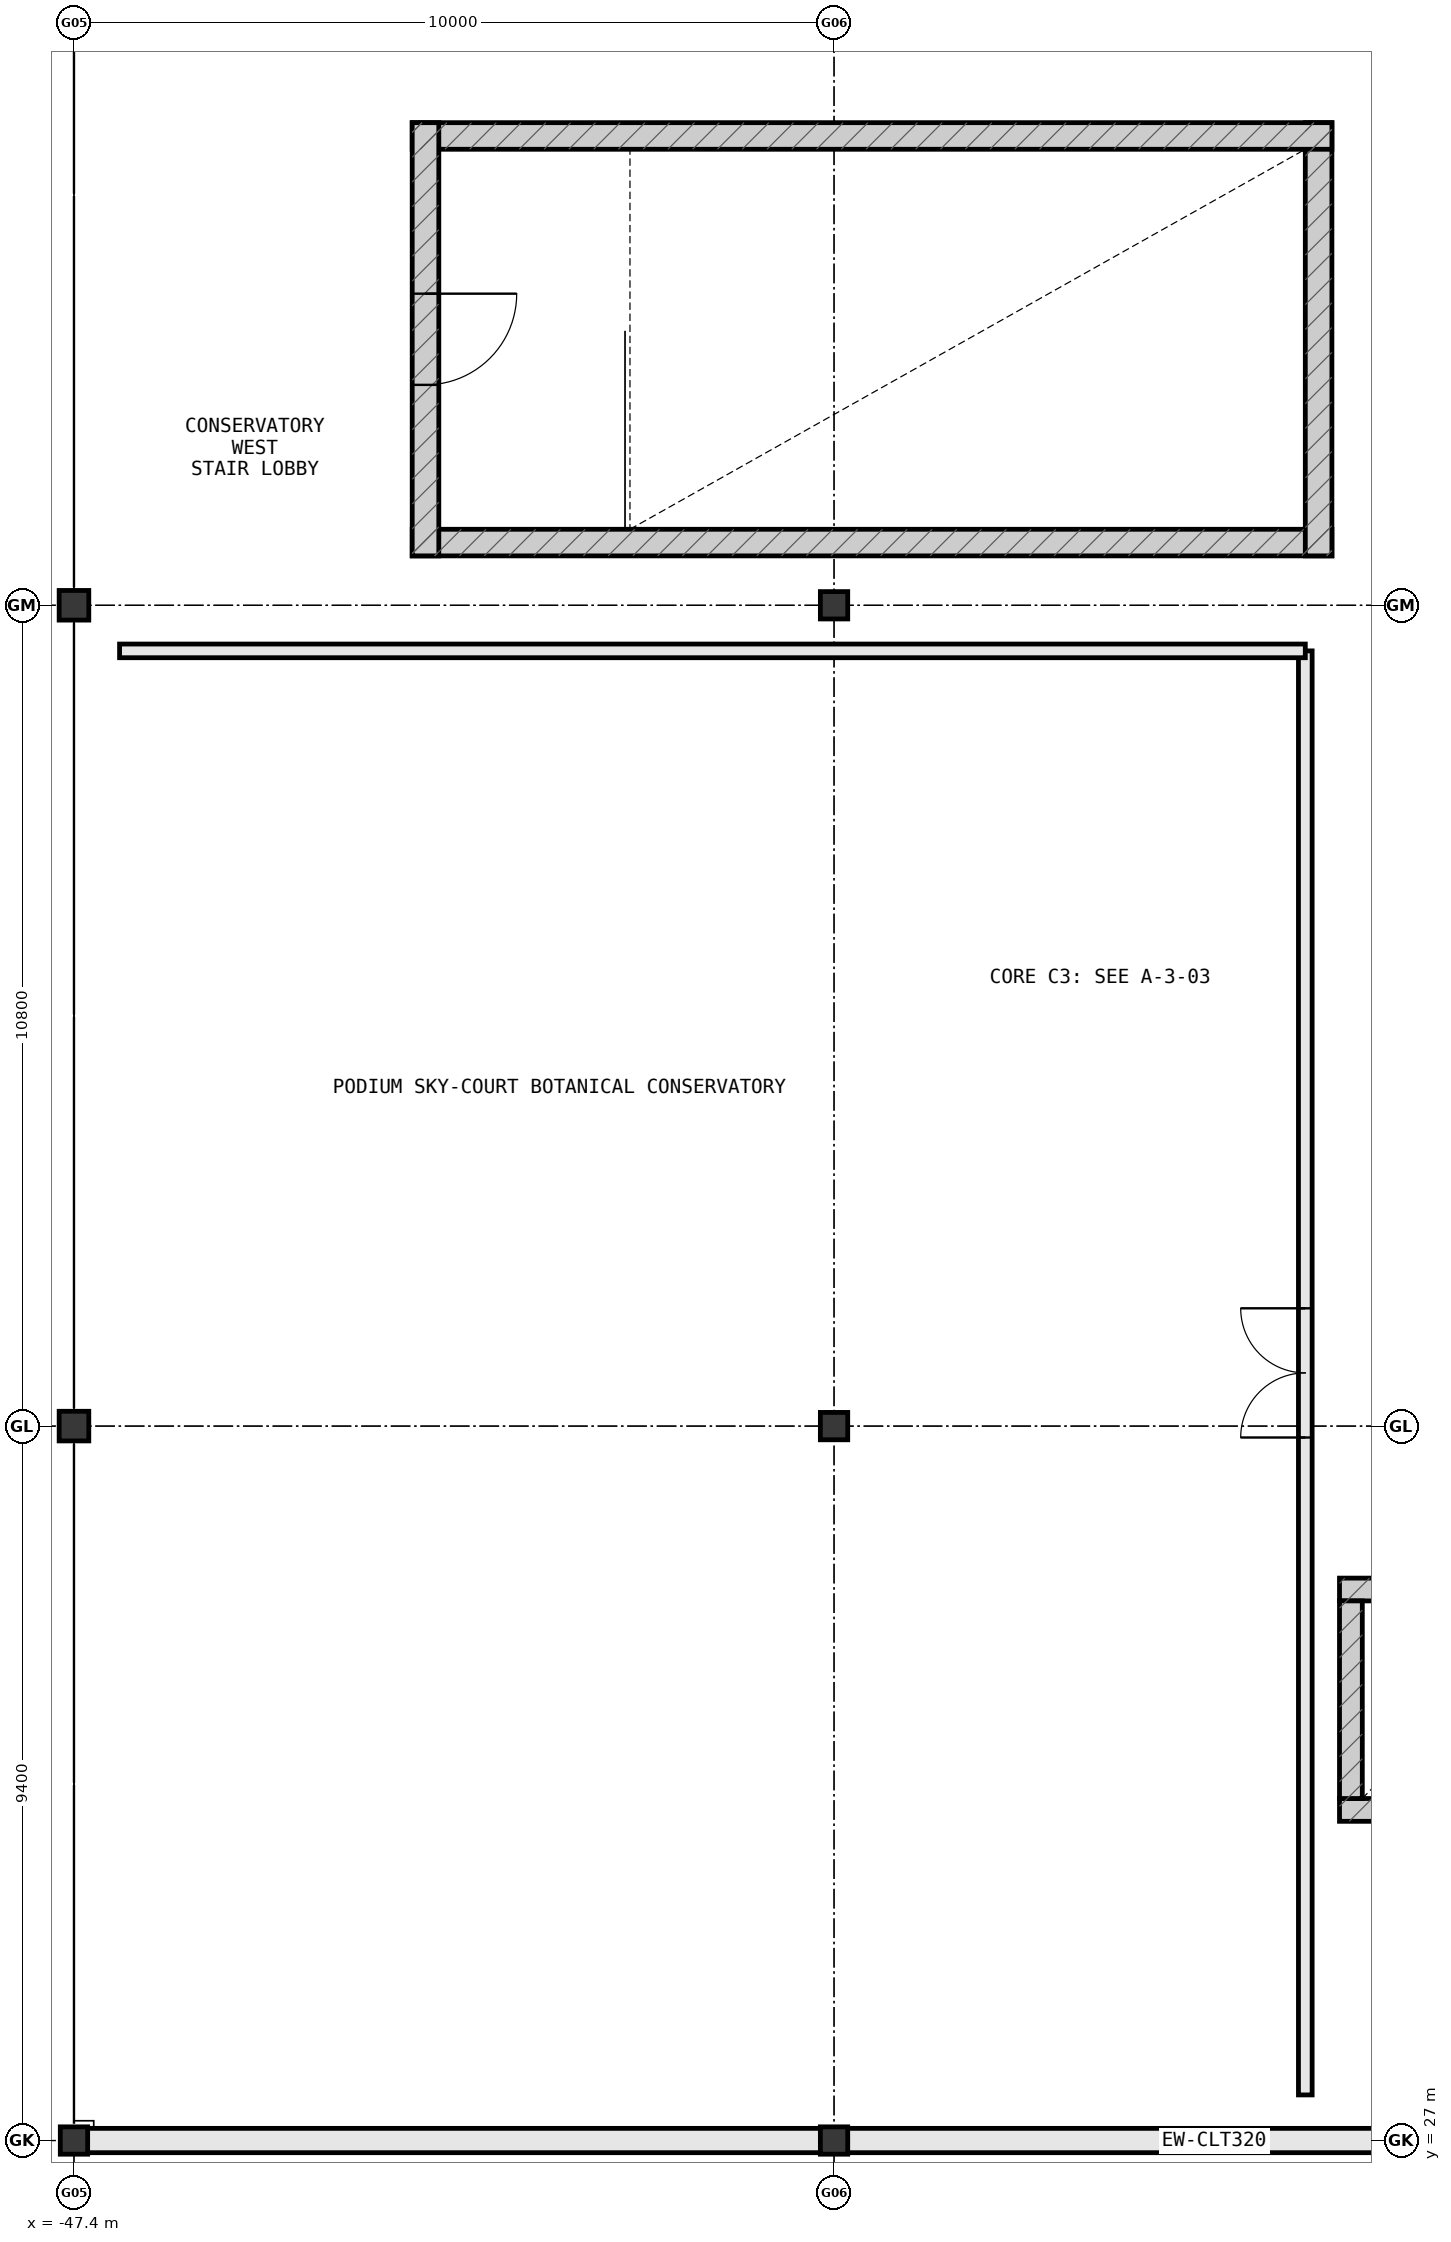
"""IFC4 building model, lengths in metres.
Left out: names, types, materials, properties, quantities, classifications, styles, units other than length and angle.
Written with IfcOpenShell. Run it as: python <this file> out.ifc"""

import sys

from ifc_helpers import new_model, si_unit, direction, frame, frame_2d, origin, origin_2d, place, context, subcontext, project, spatial, rectangle, extrude, element, fill, save


model = new_model("IFC4")
c1 = context("Model", 3, precision=1e-05, world=origin(), true_north=direction((0.0, 1.0)))
c2 = subcontext(c1, "Body", "Model", "MODEL_VIEW")
j1 = project(units=[si_unit("LENGTHUNIT", "METRE"), si_unit("PLANEANGLEUNIT", "RADIAN")], contexts=[c1])
p1 = place(None, origin())
s1 = spatial("IfcSite", under=j1, at=p1, CompositionType="ELEMENT")
p2 = place(p1, origin())
s2 = spatial("IfcBuilding", under=s1, at=p2, CompositionType="ELEMENT")
p3 = place(p2, frame((0.0, 0.0, 16.2)))
s3 = spatial("IfcBuildingStorey", under=s2, at=p3, CompositionType="ELEMENT", Elevation=16.2)
p4 = place(p3, frame((-47.4, 27.0, 0.0), z_axis=(0.0, 0.0, 1.0), x_axis=(1.0, 0.0, 0.0)))
e1 = element("IfcColumn", 1, at=p4, inside=s3, PredefinedType="COLUMN", context=c2, shape_type="SweptSolid", body=[
    extrude(rectangle(XDim=0.36, YDim=0.36, at=origin_2d()), origin(), (0.0, 0.0, 1.0), 7.149),
])
p5 = place(p3, frame((-37.4, 27.0, 0.0), z_axis=(0.0, 0.0, 1.0), x_axis=(1.0, 0.0, 0.0)))
e2 = element("IfcColumn", 2, at=p5, inside=s3, PredefinedType="COLUMN", context=c2, shape_type="SweptSolid", body=[
    extrude(rectangle(XDim=0.36, YDim=0.36, at=origin_2d()), origin(), (0.0, 0.0, 1.0), 6.968),
])
for number, where, z_axis, x_axis in (
    (3, (-47.4, 36.4, 0.0), (0.0, 0.0, 1.0), (1.0, 0.0, 0.0)),
    (4, (-47.4, 47.2, 0.0), (0.0, 0.0, 1.0), (1.0, 0.0, 0.0)),
):
    element("IfcColumn", number, at=place(p3, frame(where, z_axis=z_axis, x_axis=x_axis)), inside=s3, PredefinedType="COLUMN", context=c2, shape_type="SweptSolid", body=[
        extrude(rectangle(XDim=0.39, YDim=0.39, at=origin_2d()), origin(), (0.0, 0.0, 1.0), 3.8),
    ])
for number, where, z_axis, x_axis in (
    (5, (-37.4, 36.4, 0.0), (0.0, 0.0, 1.0), (1.0, 0.0, 0.0)),
    (6, (-37.4, 47.2, 0.0), (0.0, 0.0, 1.0), (1.0, 0.0, 0.0)),
):
    element("IfcColumn", number, at=place(p3, frame(where, z_axis=z_axis, x_axis=x_axis)), inside=s3, PredefinedType="COLUMN", context=c2, shape_type="SweptSolid", body=[
        extrude(rectangle(XDim=0.36, YDim=0.36, at=origin_2d()), origin(), (0.0, 0.0, 1.0), 3.8),
    ])
for number, where, z_axis, x_axis in (
    (7, (-47.222, 27.0, 0.0), (0.0, 0.0, 1.0), (1.0, 0.0, 0.0)),
    (8, (-37.222, 27.0, 0.0), (0.0, 0.0, 1.0), (1.0, 0.0, 0.0)),
):
    element("IfcWall", number, at=place(p3, frame(where, z_axis=z_axis, x_axis=x_axis)), inside=s3, PredefinedType="STANDARD", context=c2, shape_type="SweptSolid", body=[
        extrude(rectangle(XDim=9.644, YDim=0.32, at=frame_2d((4.822, 0.0))), origin(), (0.0, 0.0, 1.0), 2.795),
    ])
p6 = place(p3, frame((-42.95, 48.025, 0.0), z_axis=(0.0, 0.0, 1.0), x_axis=(1.0, 0.0, 0.0)))
e9 = element("IfcWall", 9, at=p6, inside=s3, PredefinedType="SHEAR", context=c2, shape_type="SweptSolid", body=[
    extrude(rectangle(XDim=12.1, YDim=0.35, at=frame_2d((6.05, 0.0))), origin(), (0.0, 0.0, 1.0), 3.56),
])
p7 = place(p3, frame((-31.025, 47.85, 0.0), z_axis=(0.0, 0.0, 1.0), x_axis=(0.0, 1.0, 0.0)))
e10 = element("IfcWall", 10, at=p7, inside=s3, PredefinedType="SHEAR", context=c2, shape_type="SweptSolid", body=[
    extrude(rectangle(XDim=5.7, YDim=0.35, at=frame_2d((2.85, 0.0))), origin(), (0.0, 0.0, 1.0), 3.56),
])
p8 = place(p3, frame((-30.85, 53.375, 0.0), z_axis=(0.0, 0.0, 1.0), x_axis=(-1.0, 0.0, 0.0)))
e11 = element("IfcWall", 11, at=p8, inside=s3, PredefinedType="SHEAR", context=c2, shape_type="SweptSolid", body=[
    extrude(rectangle(XDim=12.1, YDim=0.35, at=frame_2d((6.05, 0.0))), origin(), (0.0, 0.0, 1.0), 3.56),
])
p9 = place(p3, frame((-42.775, 53.55, 0.0), z_axis=(0.0, 0.0, 1.0), x_axis=(0.0, -1.0, 0.0)))
e12 = element("IfcWall", 12, at=p9, inside=s3, PredefinedType="SHEAR", context=c2, shape_type="SweptSolid", body=[
    extrude(rectangle(XDim=5.7, YDim=0.35, at=frame_2d((2.85, 0.0))), origin(), (0.0, 0.0, 1.0), 3.56),
])
p10 = place(p9, frame((2.25, 0.0, 0.0)))
e13 = element("IfcOpeningElement", 13, at=p10, cuts=e12, PredefinedType="OPENING", context=c2, shape_type="SweptSolid", body=[
    extrude(rectangle(XDim=1.2, YDim=2.2, at=frame_2d((0.6, 1.1))), frame((0.0, 0.187, 0.0), z_axis=(0.0, -1.0, 0.0), x_axis=(1.0, 0.0, 0.0)), (0.0, 0.0, 1.0), 0.374),
])
p11 = place(p3, frame((-30.75, 31.35, 0.0), z_axis=(0.0, 0.0, 1.0), x_axis=(1.0, 0.0, 0.0)))
e14 = element("IfcWall", 14, at=p11, inside=s3, PredefinedType="SHEAR", context=c2, shape_type="SweptSolid", body=[
    extrude(rectangle(XDim=3.1, YDim=0.3, at=frame_2d((1.55, 0.0))), origin(), (0.0, 0.0, 1.0), 3.56),
])
p12 = place(p11, frame((0.95, 0.0, 0.0)))
e15 = element("IfcOpeningElement", 15, at=p12, cuts=e14, PredefinedType="OPENING", context=c2, shape_type="SweptSolid", body=[
    extrude(rectangle(XDim=1.2, YDim=2.2, at=frame_2d((0.6, 1.1))), frame((0.0, 0.162, 0.0), z_axis=(0.0, -1.0, 0.0), x_axis=(1.0, 0.0, 0.0)), (0.0, 0.0, 1.0), 0.324),
])
p13 = place(p3, frame((-27.65, 34.25, 0.0), z_axis=(0.0, 0.0, 1.0), x_axis=(-1.0, 0.0, 0.0)))
e16 = element("IfcWall", 16, at=p13, inside=s3, PredefinedType="SHEAR", context=c2, shape_type="SweptSolid", body=[
    extrude(rectangle(XDim=3.1, YDim=0.3, at=frame_2d((1.55, 0.0))), origin(), (0.0, 0.0, 1.0), 3.56),
])
p14 = place(p3, frame((-30.6, 34.1, 0.0), z_axis=(0.0, 0.0, 1.0), x_axis=(0.0, -1.0, 0.0)))
e17 = element("IfcWall", 17, at=p14, inside=s3, PredefinedType="SHEAR", context=c2, shape_type="SweptSolid", body=[
    extrude(rectangle(XDim=2.6, YDim=0.3, at=frame_2d((1.3, 0.0))), origin(), (0.0, 0.0, 1.0), 3.56),
])
p15 = place(p3, frame((-31.2, 27.6, 0.0), z_axis=(0.0, 0.0, 1.0), x_axis=(0.0, 1.0, 0.0)))
e18 = element("IfcWall", 18, at=p15, inside=s3, PredefinedType="PARTITIONING", context=c2, shape_type="SweptSolid", body=[
    extrude(rectangle(XDim=19.0, YDim=0.18, at=frame_2d((9.5, 0.0))), origin(), (0.0, 0.0, 1.0), 3.56),
])
p16 = place(p15, frame((8.65, 0.0, 0.0)))
e19 = element("IfcOpeningElement", 19, at=p16, cuts=e18, PredefinedType="OPENING", context=c2, shape_type="SweptSolid", body=[
    extrude(rectangle(XDim=1.7, YDim=2.3, at=frame_2d((0.85, 1.15))), frame((0.0, 0.102, 0.0), z_axis=(0.0, -1.0, 0.0), x_axis=(1.0, 0.0, 0.0)), (0.0, 0.0, 1.0), 0.204),
])
p17 = place(p3, frame((-31.2, 46.6, 0.0), z_axis=(0.0, 0.0, 1.0), x_axis=(-1.0, 0.0, 0.0)))
e20 = element("IfcWall", 20, at=p17, inside=s3, PredefinedType="PARTITIONING", context=c2, shape_type="SweptSolid", body=[
    extrude(rectangle(XDim=15.6, YDim=0.18, at=frame_2d((7.8, 0.0))), origin(), (0.0, 0.0, 1.0), 3.56),
])
p18 = place(p10, origin())
e21 = element("IfcDoor", 21, at=p18, inside=s3, OperationType="SINGLE_SWING_LEFT", PredefinedType="DOOR", context=c2, shape_type="SweptSolid", body=[
    extrude(rectangle(XDim=1.2, YDim=2.2, at=frame_2d((0.6, 1.1))), frame((0.0, 0.025, 0.0), z_axis=(0.0, -1.0, 0.0), x_axis=(1.0, 0.0, 0.0)), (0.0, 0.0, 1.0), 0.05),
])
fill(e13, e21)
p19 = place(p16, origin())
e22 = element("IfcDoor", 22, at=p19, inside=s3, OperationType="DOUBLE_DOOR_SINGLE_SWING", PredefinedType="DOOR", context=c2, shape_type="SweptSolid", body=[
    extrude(rectangle(XDim=1.7, YDim=2.3, at=frame_2d((0.85, 1.15))), frame((0.0, 0.025, 0.0), z_axis=(0.0, -1.0, 0.0), x_axis=(1.0, 0.0, 0.0)), (0.0, 0.0, 1.0), 0.05),
])
fill(e19, e22)
save(model, sys.argv[1])
